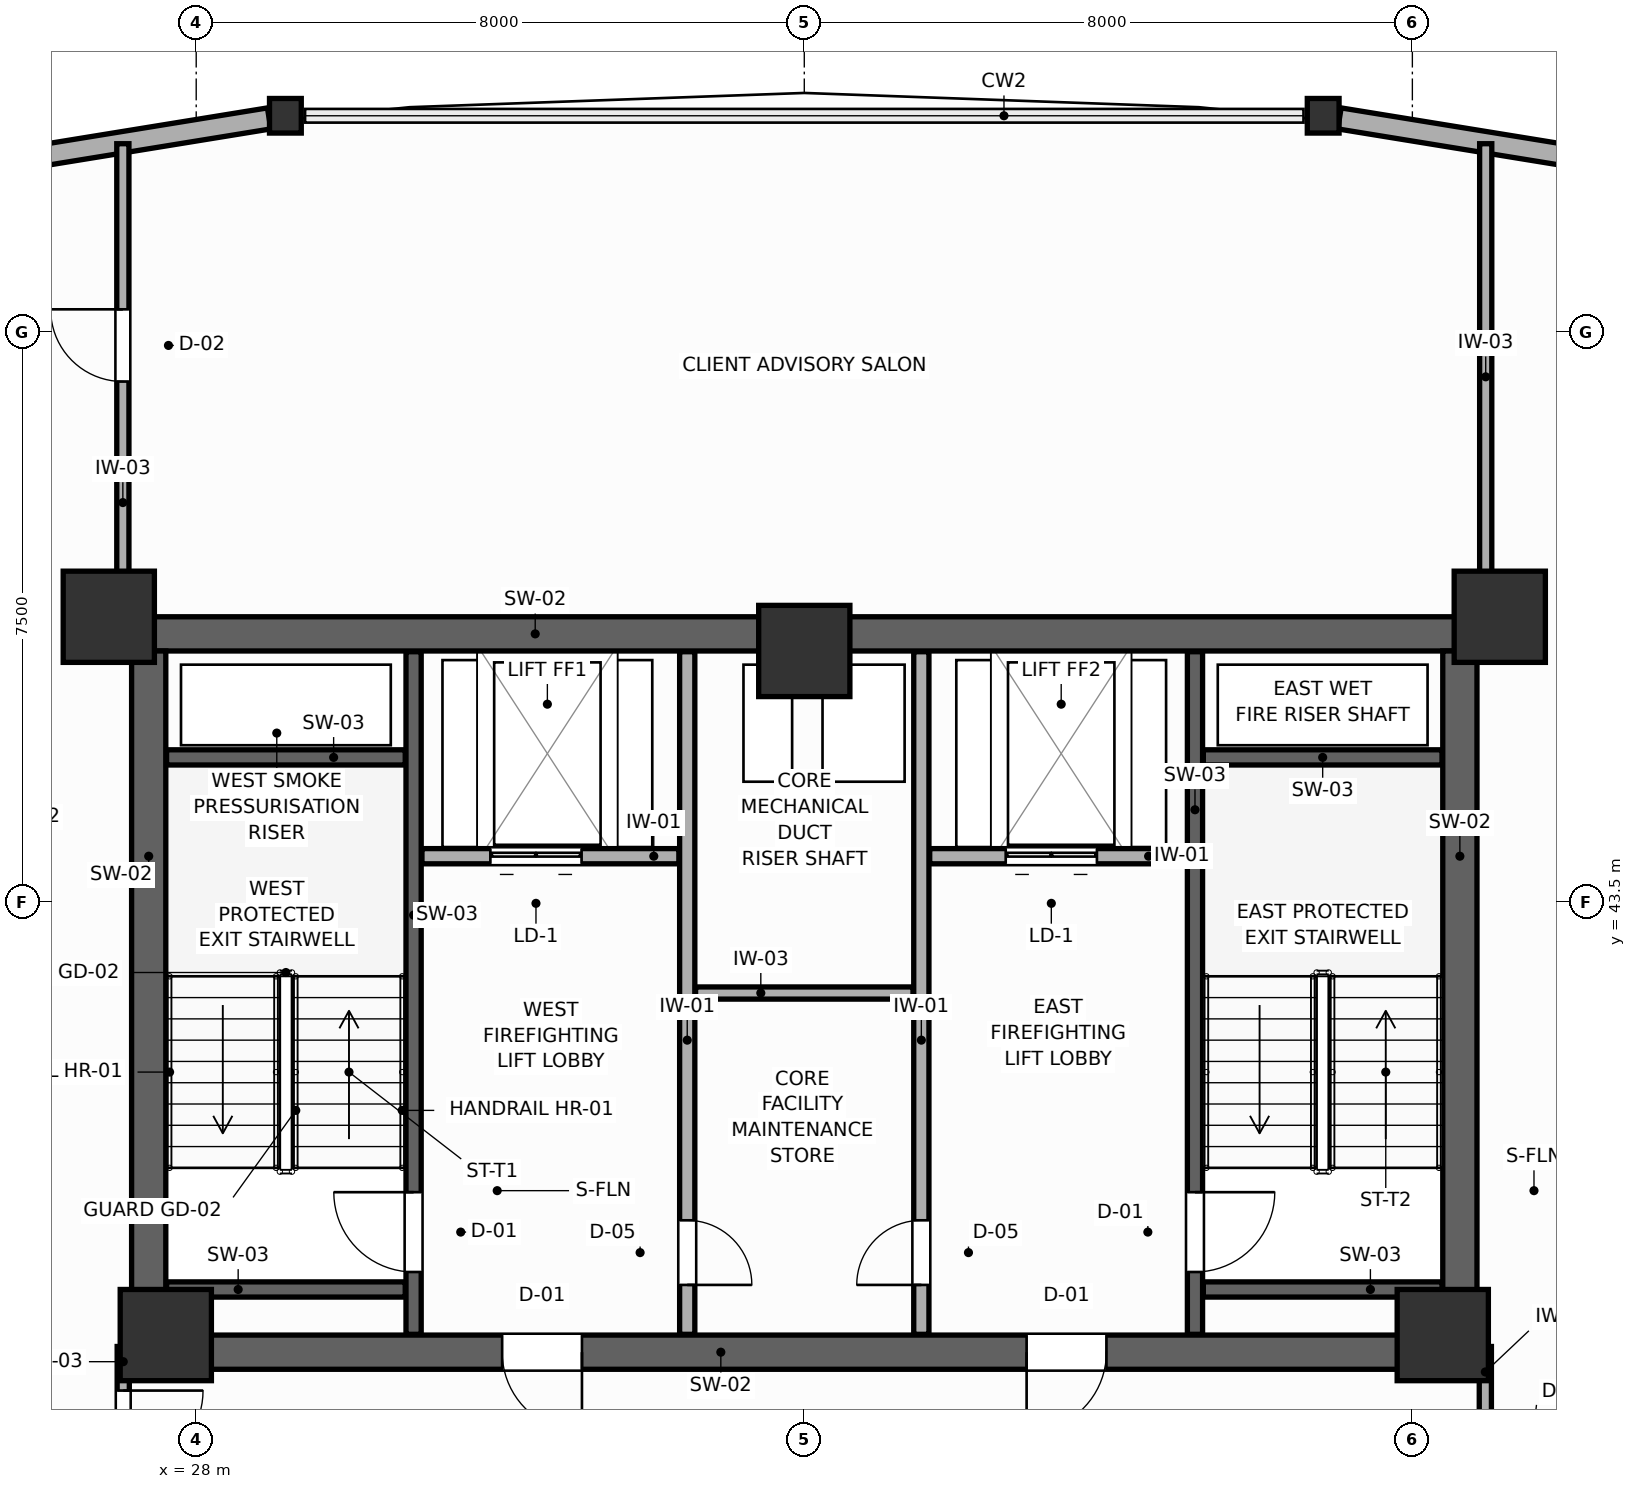
"""IFC4 building model, lengths in metres.
Left out: names, types, materials, properties, quantities, classifications, styles, units other than length and angle.
Written with IfcOpenShell. Run it as: python <this file> out.ifc"""

import sys

from ifc_helpers import new_model, si_unit, direction, frame, frame_2d, origin, origin_2d, place, context, subcontext, project, spatial, rectangle, i_section, extrude, source, transform, mapped, element, fill, save


model = new_model("IFC4")
c1 = context("Model", 3, precision=1e-05, world=origin(), true_north=direction((0.0, 1.0)))
c2 = subcontext(c1, "Body", "Model", "MODEL_VIEW")
j1 = project(units=[si_unit("LENGTHUNIT", "METRE"), si_unit("PLANEANGLEUNIT", "RADIAN")], contexts=[c1])
p1 = place(None, origin())
s1 = spatial("IfcSite", under=j1, at=p1, CompositionType="ELEMENT")
p2 = place(p1, origin())
s2 = spatial("IfcBuilding", under=s1, at=p2, CompositionType="ELEMENT")
p3 = place(p2, frame((0.0, 0.0, 127.8)))
s3 = spatial("IfcBuildingStorey", under=s2, at=p3, CompositionType="ELEMENT", Elevation=127.8)
p4 = place(p3, frame((27.15, 47.025, 0.0), z_axis=(0.0, 0.0, 1.0), x_axis=(1.0, 0.0, 0.0)))
e1 = element("IfcWall", 1, at=p4, inside=s3, PredefinedType="SHEAR", context=c2, shape_type="SweptSolid", body=[
    extrude(rectangle(XDim=17.7, YDim=0.45, at=frame_2d((8.85, 0.0))), origin(), (0.0, 0.0, 1.0), 3.6),
])
p5 = place(p3, frame((27.15, 37.575, 0.0), z_axis=(0.0, 0.0, 1.0), x_axis=(1.0, 0.0, 0.0)))
e2 = element("IfcWall", 2, at=p5, inside=s3, PredefinedType="SHEAR", context=c2, shape_type="SweptSolid", body=[
    extrude(rectangle(XDim=17.7, YDim=0.45, at=frame_2d((8.85, 0.0))), origin(), (0.0, 0.0, 1.0), 3.6),
])
p6 = place(p5, frame((4.875, 0.0, 0.0)))
e3 = element("IfcOpeningElement", 3, at=p6, cuts=e2, PredefinedType="OPENING", context=c2, shape_type="SweptSolid", body=[
    extrude(rectangle(XDim=1.05, YDim=2.1, at=frame_2d((0.525, 1.05))), frame((0.0, 0.235, 0.0), z_axis=(0.0, -1.0, 0.0), x_axis=(1.0, 0.0, 0.0)), (0.0, 0.0, 1.0), 0.47),
])
p7 = place(p5, frame((11.775, 0.0, 0.0)))
e4 = element("IfcOpeningElement", 4, at=p7, cuts=e2, PredefinedType="OPENING", context=c2, shape_type="SweptSolid", body=[
    extrude(rectangle(XDim=1.05, YDim=2.1, at=frame_2d((0.525, 1.05))), frame((0.0, 0.235, 0.0), z_axis=(0.0, -1.0, 0.0), x_axis=(1.0, 0.0, 0.0)), (0.0, 0.0, 1.0), 0.47),
])
for number, where, z_axis, x_axis in (
    (5, (27.375, 37.8, 0.0), (0.0, 0.0, 1.0), (0.0, 1.0, 0.0)),
    (6, (44.625, 37.8, 0.0), (0.0, 0.0, 1.0), (0.0, 1.0, 0.0)),
):
    element("IfcWall", number, at=place(p3, frame(where, z_axis=z_axis, x_axis=x_axis)), inside=s3, PredefinedType="SHEAR", context=c2, shape_type="SweptSolid", body=[
        extrude(rectangle(XDim=9.0, YDim=0.45, at=frame_2d((4.5, 0.0))), origin(), (0.0, 0.0, 1.0), 3.6),
    ])
m1 = source(origin(), c2, "Body", "SweptSolid", [
    extrude(rectangle(XDim=1.2, YDim=1.2, at=origin_2d()), origin(), (0.0, 0.0, 1.0), 3.6),
])
for number, where, z_axis, x_axis in (
    (7, (26.85, 47.25, 0.0), (0.0, 0.0, 1.0), (1.0, 0.0, 0.0)),
    (8, (45.15, 47.25, 0.0), (0.0, 0.0, 1.0), (1.0, 0.0, 0.0)),
    (9, (27.6, 37.8, 0.0), (0.0, 0.0, 1.0), (1.0, 0.0, 0.0)),
    (10, (44.4, 37.8, 0.0), (0.0, 0.0, 1.0), (1.0, 0.0, 0.0)),
    (11, (36.0, 46.8, 0.0), (0.0, 0.0, 1.0), (1.0, 0.0, 0.0)),
):
    element("IfcColumn", number, at=place(p3, frame(where, z_axis=z_axis, x_axis=x_axis)), inside=s3, PredefinedType="COLUMN", context=c2, shape_type="MappedRepresentation", body=[
        mapped(m1, transform((0.0, 0.0, 0.0), scale=1.0)),
    ])
m2 = source(origin(), c2, "Body", "SweptSolid", [
    extrude(i_section(OverallWidth=0.418, OverallDepth=0.455, WebThickness=0.039, FlangeThickness=0.063, FilletRadius=0.015, at=origin_2d()), origin(), (0.0, 0.0, 1.0), 3.6),
])
for number, where, z_axis, x_axis in (
    (12, (42.827, 53.841, 0.0), (0.0, 0.0, 1.0), (1.0, 0.0, 0.0)),
    (13, (29.173, 53.841, 0.0), (0.0, 0.0, 1.0), (1.0, 0.0, 0.0)),
):
    element("IfcColumn", number, at=place(p3, frame(where, z_axis=z_axis, x_axis=x_axis)), inside=s3, PredefinedType="COLUMN", context=c2, shape_type="MappedRepresentation", body=[
        mapped(m2, transform((0.0, 0.0, 0.0), scale=1.0)),
    ])
p8 = place(p3, frame((58.42, 51.306, 0.0), z_axis=(0.0, 0.0, 1.0), x_axis=(-0.987036263752, 0.160497395736, 0.0)))
e14 = element("IfcWall", 14, at=p8, inside=s3, PredefinedType="SOLIDWALL", context=c2, shape_type="SweptSolid", body=[
    extrude(rectangle(XDim=15.581, YDim=0.28, at=frame_2d((7.791, 0.0))), origin(), (0.0, 0.0, 1.0), 2.86),
])
p9 = place(p3, frame((28.959, 53.806, 0.0), z_axis=(0.0, 0.0, 1.0), x_axis=(-0.987036263752, -0.160497395736, 0.0)))
e15 = element("IfcWall", 15, at=p9, inside=s3, PredefinedType="SOLIDWALL", context=c2, shape_type="SweptSolid", body=[
    extrude(rectangle(XDim=15.581, YDim=0.28, at=frame_2d((7.791, 0.0))), origin(), (0.0, 0.0, 1.0), 2.81),
])
p10 = place(p3, frame((30.86, 37.81, 0.0), z_axis=(0.0, 0.0, 1.0), x_axis=(0.0, 1.0, 0.0)))
e16 = element("IfcWall", 16, at=p10, inside=s3, PredefinedType="SHEAR", context=c2, shape_type="SweptSolid", body=[
    extrude(rectangle(XDim=8.98, YDim=0.2, at=frame_2d((4.49, 0.0))), origin(), (0.0, 0.0, 1.0), 3.6),
])
p11 = place(p10, frame((0.82, 0.0, 0.0)))
e17 = element("IfcOpeningElement", 17, at=p11, cuts=e16, PredefinedType="OPENING", context=c2, shape_type="SweptSolid", body=[
    extrude(rectangle(XDim=1.05, YDim=2.1, at=frame_2d((0.525, 1.05))), frame((0.0, 0.11, 0.0), z_axis=(0.0, -1.0, 0.0), x_axis=(1.0, 0.0, 0.0)), (0.0, 0.0, 1.0), 0.22),
])
for number, where, z_axis, x_axis in (
    (18, (27.61, 45.4, 0.0), (0.0, 0.0, 1.0), (1.0, 0.0, 0.0)),
    (19, (27.61, 38.4, 0.0), (0.0, 0.0, 1.0), (1.0, 0.0, 0.0)),
):
    element("IfcWall", number, at=place(p3, frame(where, z_axis=z_axis, x_axis=x_axis)), inside=s3, PredefinedType="SHEAR", context=c2, shape_type="SweptSolid", body=[
        extrude(rectangle(XDim=3.14, YDim=0.2, at=frame_2d((1.57, 0.0))), origin(), (0.0, 0.0, 1.0), 3.6),
    ])
p12 = place(p3, frame((41.14, 37.81, 0.0), z_axis=(0.0, 0.0, 1.0), x_axis=(0.0, 1.0, 0.0)))
e20 = element("IfcWall", 20, at=p12, inside=s3, PredefinedType="SHEAR", context=c2, shape_type="SweptSolid", body=[
    extrude(rectangle(XDim=8.98, YDim=0.2, at=frame_2d((4.49, 0.0))), origin(), (0.0, 0.0, 1.0), 3.6),
])
p13 = place(p12, frame((0.82, 0.0, 0.0)))
e21 = element("IfcOpeningElement", 21, at=p13, cuts=e20, PredefinedType="OPENING", context=c2, shape_type="SweptSolid", body=[
    extrude(rectangle(XDim=1.05, YDim=2.1, at=frame_2d((0.525, 1.05))), frame((0.0, 0.11, 0.0), z_axis=(0.0, -1.0, 0.0), x_axis=(1.0, 0.0, 0.0)), (0.0, 0.0, 1.0), 0.22),
])
for number, where, z_axis, x_axis in (
    (22, (41.25, 45.4, 0.0), (0.0, 0.0, 1.0), (1.0, 0.0, 0.0)),
    (23, (41.25, 38.4, 0.0), (0.0, 0.0, 1.0), (1.0, 0.0, 0.0)),
):
    element("IfcWall", number, at=place(p3, frame(where, z_axis=z_axis, x_axis=x_axis)), inside=s3, PredefinedType="SHEAR", context=c2, shape_type="SweptSolid", body=[
        extrude(rectangle(XDim=3.14, YDim=0.2, at=frame_2d((1.57, 0.0))), origin(), (0.0, 0.0, 1.0), 3.6),
    ])
p14 = place(p3, frame((30.97, 44.1, 0.0), z_axis=(0.0, 0.0, 1.0), x_axis=(1.0, 0.0, 0.0)))
e24 = element("IfcWall", 24, at=p14, inside=s3, PredefinedType="PARTITIONING", context=c2, shape_type="SweptSolid", body=[
    extrude(rectangle(XDim=3.38, YDim=0.2, at=frame_2d((1.69, 0.0))), origin(), (0.0, 0.0, 1.0), 3.26),
])
p15 = place(p14, frame((0.9, 0.0, 0.0)))
e25 = element("IfcOpeningElement", 25, at=p15, cuts=e24, PredefinedType="OPENING", context=c2, shape_type="SweptSolid", body=[
    extrude(rectangle(XDim=1.2, YDim=2.1, at=frame_2d((0.6, 1.05))), frame((0.0, 0.11, 0.0), z_axis=(0.0, -1.0, 0.0), x_axis=(1.0, 0.0, 0.0)), (0.0, 0.0, 1.0), 0.22),
])
p16 = place(p3, frame((37.65, 44.1, 0.0), z_axis=(0.0, 0.0, 1.0), x_axis=(1.0, 0.0, 0.0)))
e26 = element("IfcWall", 26, at=p16, inside=s3, PredefinedType="PARTITIONING", context=c2, shape_type="SweptSolid", body=[
    extrude(rectangle(XDim=3.38, YDim=0.2, at=frame_2d((1.69, 0.0))), origin(), (0.0, 0.0, 1.0), 3.26),
])
p17 = place(p16, frame((1.0, 0.0, 0.0)))
e27 = element("IfcOpeningElement", 27, at=p17, cuts=e26, PredefinedType="OPENING", context=c2, shape_type="SweptSolid", body=[
    extrude(rectangle(XDim=1.2, YDim=2.1, at=frame_2d((0.6, 1.05))), frame((0.0, 0.11, 0.0), z_axis=(0.0, -1.0, 0.0), x_axis=(1.0, 0.0, 0.0)), (0.0, 0.0, 1.0), 0.22),
])
p18 = place(p3, frame((34.46, 37.81, 0.0), z_axis=(0.0, 0.0, 1.0), x_axis=(0.0, 1.0, 0.0)))
e28 = element("IfcWall", 28, at=p18, inside=s3, PredefinedType="PARTITIONING", context=c2, shape_type="SweptSolid", body=[
    extrude(rectangle(XDim=8.98, YDim=0.2, at=frame_2d((4.49, 0.0))), origin(), (0.0, 0.0, 1.0), 3.26),
])
p19 = place(p18, frame((0.65, 0.0, 0.0)))
e29 = element("IfcOpeningElement", 29, at=p19, cuts=e28, PredefinedType="OPENING", context=c2, shape_type="SweptSolid", body=[
    extrude(rectangle(XDim=0.85, YDim=2.05, at=frame_2d((0.425, 1.025))), frame((0.0, 0.11, 0.0), z_axis=(0.0, -1.0, 0.0), x_axis=(1.0, 0.0, 0.0)), (0.0, 0.0, 1.0), 0.22),
])
p20 = place(p3, frame((37.54, 37.81, 0.0), z_axis=(0.0, 0.0, 1.0), x_axis=(0.0, 1.0, 0.0)))
e30 = element("IfcWall", 30, at=p20, inside=s3, PredefinedType="PARTITIONING", context=c2, shape_type="SweptSolid", body=[
    extrude(rectangle(XDim=8.98, YDim=0.2, at=frame_2d((4.49, 0.0))), origin(), (0.0, 0.0, 1.0), 3.26),
])
p21 = place(p20, frame((0.65, 0.0, 0.0)))
e31 = element("IfcOpeningElement", 31, at=p21, cuts=e30, PredefinedType="OPENING", context=c2, shape_type="SweptSolid", body=[
    extrude(rectangle(XDim=0.85, YDim=2.05, at=frame_2d((0.425, 1.025))), frame((0.0, 0.11, 0.0), z_axis=(0.0, -1.0, 0.0), x_axis=(1.0, 0.0, 0.0)), (0.0, 0.0, 1.0), 0.22),
])
p22 = place(p3, frame((34.57, 42.3, 0.0), z_axis=(0.0, 0.0, 1.0), x_axis=(1.0, 0.0, 0.0)))
e32 = element("IfcWall", 32, at=p22, inside=s3, PredefinedType="PARTITIONING", context=c2, shape_type="SweptSolid", body=[
    extrude(rectangle(XDim=2.86, YDim=0.16, at=frame_2d((1.43, 0.0))), origin(), (0.0, 0.0, 1.0), 3.26),
])
p23 = place(p3, frame((27.04, 35.54, 0.0), z_axis=(0.0, 0.0, 1.0), x_axis=(0.0, 1.0, 0.0)))
e33 = element("IfcWall", 33, at=p23, inside=s3, PredefinedType="PARTITIONING", context=c2, shape_type="SweptSolid", body=[
    extrude(rectangle(XDim=2.11, YDim=0.16, at=frame_2d((1.055, 0.0))), origin(), (0.0, 0.0, 1.0), 3.26),
])
p24 = place(p23, frame((0.48, 0.0, 0.0)))
e34 = element("IfcOpeningElement", 34, at=p24, cuts=e33, PredefinedType="OPENING", context=c2, shape_type="SweptSolid", body=[
    extrude(rectangle(XDim=1.05, YDim=2.1, at=frame_2d((0.525, 1.05))), frame((0.0, 0.09, 0.0), z_axis=(0.0, -1.0, 0.0), x_axis=(1.0, 0.0, 0.0)), (0.0, 0.0, 1.0), 0.18),
])
p25 = place(p3, frame((44.96, 35.0, 0.0), z_axis=(0.0, 0.0, 1.0), x_axis=(0.0, 1.0, 0.0)))
e35 = element("IfcWall", 35, at=p25, inside=s3, PredefinedType="PARTITIONING", context=c2, shape_type="SweptSolid", body=[
    extrude(rectangle(XDim=2.65, YDim=0.16, at=frame_2d((1.325, 0.0))), origin(), (0.0, 0.0, 1.0), 3.26),
])
p26 = place(p25, frame((0.75, 0.0, 0.0)))
e36 = element("IfcOpeningElement", 36, at=p26, cuts=e35, PredefinedType="OPENING", context=c2, shape_type="SweptSolid", body=[
    extrude(rectangle(XDim=1.05, YDim=2.1, at=frame_2d((0.525, 1.05))), frame((0.0, 0.09, 0.0), z_axis=(0.0, -1.0, 0.0), x_axis=(1.0, 0.0, 0.0)), (0.0, 0.0, 1.0), 0.18),
])
p27 = place(p3, frame((27.035, 47.34, 0.0), z_axis=(0.0, 0.0, 1.0), x_axis=(0.0, 1.0, 0.0)))
e37 = element("IfcWall", 37, at=p27, inside=s3, PredefinedType="PARTITIONING", context=c2, shape_type="SweptSolid", body=[
    extrude(rectangle(XDim=6.133, YDim=0.16, at=frame_2d((3.067, 0.0))), origin(), (0.0, 0.0, 1.0), 3.26),
])
p28 = place(p27, frame((3.005, 0.0, 0.0)))
e38 = element("IfcOpeningElement", 38, at=p28, cuts=e37, PredefinedType="OPENING", context=c2, shape_type="SweptSolid", body=[
    extrude(rectangle(XDim=0.95, YDim=2.05, at=frame_2d((0.475, 1.025))), frame((0.0, 0.09, 0.0), z_axis=(0.0, -1.0, 0.0), x_axis=(1.0, 0.0, 0.0)), (0.0, 0.0, 1.0), 0.18),
])
p29 = place(p3, frame((44.965, 47.34, 0.0), z_axis=(0.0, 0.0, 1.0), x_axis=(0.0, 1.0, 0.0)))
e39 = element("IfcWall", 39, at=p29, inside=s3, PredefinedType="PARTITIONING", context=c2, shape_type="SweptSolid", body=[
    extrude(rectangle(XDim=6.133, YDim=0.16, at=frame_2d((3.067, 0.0))), origin(), (0.0, 0.0, 1.0), 3.26),
])
p30 = place(p11, origin())
e40 = element("IfcDoor", 40, at=p30, inside=s3, OperationType="SINGLE_SWING_RIGHT", PredefinedType="DOOR", context=c2, shape_type="SweptSolid", body=[
    extrude(rectangle(XDim=1.05, YDim=2.1, at=frame_2d((0.525, 1.05))), frame((0.0, 0.025, 0.0), z_axis=(0.0, -1.0, 0.0), x_axis=(1.0, 0.0, 0.0)), (0.0, 0.0, 1.0), 0.05),
])
fill(e17, e40)
p31 = place(p13, frame((1.05, 0.0, 0.0), z_axis=(0.0, 0.0, 1.0), x_axis=(-1.0, 0.0, 0.0)))
e41 = element("IfcDoor", 41, at=p31, inside=s3, OperationType="SINGLE_SWING_LEFT", PredefinedType="DOOR", context=c2, shape_type="SweptSolid", body=[
    extrude(rectangle(XDim=1.05, YDim=2.1, at=frame_2d((0.525, 1.05))), frame((0.0, 0.025, 0.0), z_axis=(0.0, -1.0, 0.0), x_axis=(1.0, 0.0, 0.0)), (0.0, 0.0, 1.0), 0.05),
])
fill(e21, e41)
p32 = place(p15, origin())
e42 = element("IfcDoor", 42, at=p32, inside=s3, OperationType="DOUBLE_DOOR_SLIDING", PredefinedType="DOOR", context=c2, shape_type="SweptSolid", body=[
    extrude(rectangle(XDim=1.2, YDim=2.1, at=frame_2d((0.6, 1.05))), frame((0.0, 0.025, 0.0), z_axis=(0.0, -1.0, 0.0), x_axis=(1.0, 0.0, 0.0)), (0.0, 0.0, 1.0), 0.05),
])
fill(e25, e42)
p33 = place(p17, origin())
e43 = element("IfcDoor", 43, at=p33, inside=s3, OperationType="DOUBLE_DOOR_SLIDING", PredefinedType="DOOR", context=c2, shape_type="SweptSolid", body=[
    extrude(rectangle(XDim=1.2, YDim=2.1, at=frame_2d((0.6, 1.05))), frame((0.0, 0.025, 0.0), z_axis=(0.0, -1.0, 0.0), x_axis=(1.0, 0.0, 0.0)), (0.0, 0.0, 1.0), 0.05),
])
fill(e27, e43)
p34 = place(p19, frame((0.85, 0.0, 0.0), z_axis=(0.0, 0.0, 1.0), x_axis=(-1.0, 0.0, 0.0)))
e44 = element("IfcDoor", 44, at=p34, inside=s3, OperationType="SINGLE_SWING_RIGHT", PredefinedType="DOOR", context=c2, shape_type="SweptSolid", body=[
    extrude(rectangle(XDim=0.85, YDim=2.05, at=frame_2d((0.425, 1.025))), frame((0.0, 0.025, 0.0), z_axis=(0.0, -1.0, 0.0), x_axis=(1.0, 0.0, 0.0)), (0.0, 0.0, 1.0), 0.05),
])
fill(e29, e44)
p35 = place(p21, origin())
e45 = element("IfcDoor", 45, at=p35, inside=s3, OperationType="SINGLE_SWING_LEFT", PredefinedType="DOOR", context=c2, shape_type="SweptSolid", body=[
    extrude(rectangle(XDim=0.85, YDim=2.05, at=frame_2d((0.425, 1.025))), frame((0.0, 0.025, 0.0), z_axis=(0.0, -1.0, 0.0), x_axis=(1.0, 0.0, 0.0)), (0.0, 0.0, 1.0), 0.05),
])
fill(e31, e45)
p36 = place(p24, frame((1.05, 0.0, 0.0), z_axis=(0.0, 0.0, 1.0), x_axis=(-1.0, 0.0, 0.0)))
e46 = element("IfcDoor", 46, at=p36, inside=s3, OperationType="SINGLE_SWING_LEFT", PredefinedType="DOOR", context=c2, shape_type="SweptSolid", body=[
    extrude(rectangle(XDim=1.05, YDim=2.1, at=frame_2d((0.525, 1.05))), frame((0.0, 0.025, 0.0), z_axis=(0.0, -1.0, 0.0), x_axis=(1.0, 0.0, 0.0)), (0.0, 0.0, 1.0), 0.05),
])
fill(e34, e46)
p37 = place(p28, origin())
e47 = element("IfcDoor", 47, at=p37, inside=s3, OperationType="SINGLE_SWING_RIGHT", PredefinedType="DOOR", context=c2, shape_type="SweptSolid", body=[
    extrude(rectangle(XDim=0.95, YDim=2.05, at=frame_2d((0.475, 1.025))), frame((0.0, 0.025, 0.0), z_axis=(0.0, -1.0, 0.0), x_axis=(1.0, 0.0, 0.0)), (0.0, 0.0, 1.0), 0.05),
])
fill(e38, e47)
p38 = place(p6, frame((1.05, 0.0, 0.0), z_axis=(0.0, 0.0, 1.0), x_axis=(-1.0, 0.0, 0.0)))
e48 = element("IfcDoor", 48, at=p38, inside=s3, OperationType="SINGLE_SWING_LEFT", PredefinedType="DOOR", context=c2, shape_type="SweptSolid", body=[
    extrude(rectangle(XDim=1.05, YDim=2.1, at=frame_2d((0.525, 1.05))), frame((0.0, 0.025, 0.0), z_axis=(0.0, -1.0, 0.0), x_axis=(1.0, 0.0, 0.0)), (0.0, 0.0, 1.0), 0.05),
])
fill(e3, e48)
p39 = place(p7, frame((1.05, 0.0, 0.0), z_axis=(0.0, 0.0, 1.0), x_axis=(-1.0, 0.0, 0.0)))
e49 = element("IfcDoor", 49, at=p39, inside=s3, OperationType="SINGLE_SWING_RIGHT", PredefinedType="DOOR", context=c2, shape_type="SweptSolid", body=[
    extrude(rectangle(XDim=1.05, YDim=2.1, at=frame_2d((0.525, 1.05))), frame((0.0, 0.025, 0.0), z_axis=(0.0, -1.0, 0.0), x_axis=(1.0, 0.0, 0.0)), (0.0, 0.0, 1.0), 0.05),
])
fill(e4, e49)
save(model, sys.argv[1])
